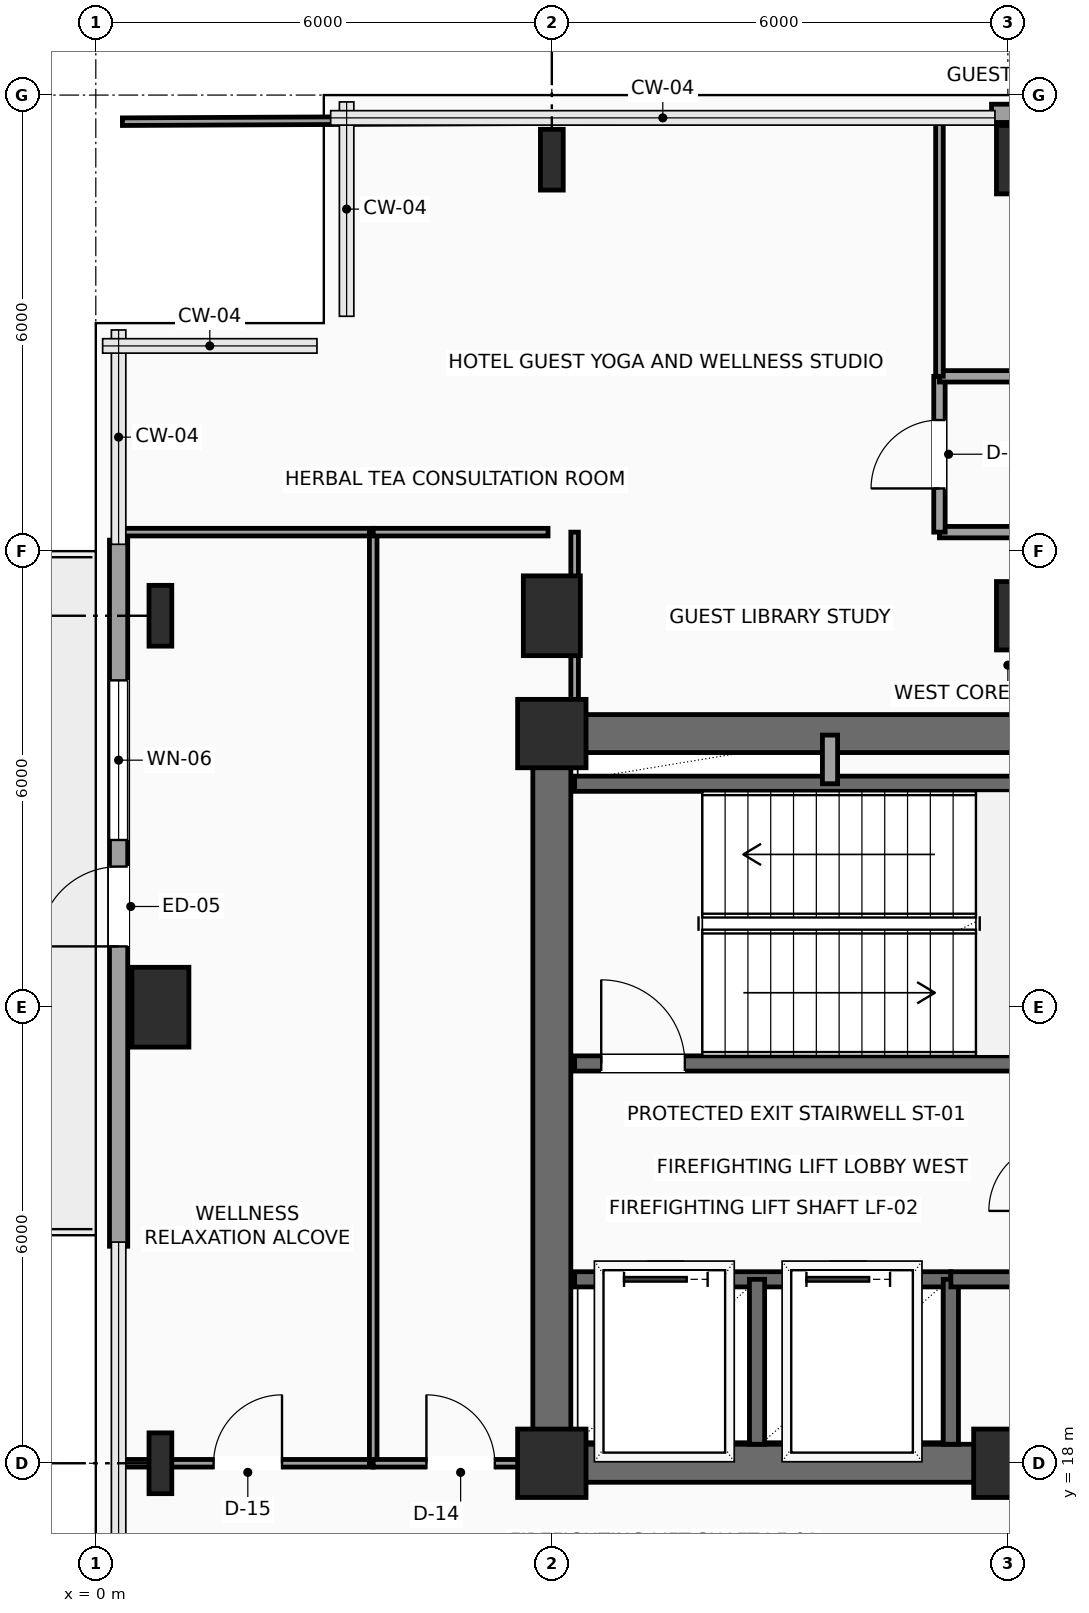
"""IFC4 building model, lengths in metres.
Left out: names, types, materials, properties, quantities, classifications, styles, units other than length and angle.
Written with IfcOpenShell. Run it as: python <this file> out.ifc"""

import sys

from ifc_helpers import new_model, si_unit, direction, frame, frame_2d, origin, origin_2d, place, context, subcontext, project, spatial, rectangle, i_section, extrude, element, fill, save


model = new_model("IFC4")
c1 = context("Model", 3, precision=1e-05, world=origin(), true_north=direction((0.0, 1.0)))
c2 = subcontext(c1, "Body", "Model", "MODEL_VIEW")
j1 = project(units=[si_unit("LENGTHUNIT", "METRE"), si_unit("PLANEANGLEUNIT", "RADIAN")], contexts=[c1])
p1 = place(None, origin())
s1 = spatial("IfcSite", under=j1, at=p1, CompositionType="ELEMENT")
p2 = place(p1, origin())
s2 = spatial("IfcBuilding", under=s1, at=p2, CompositionType="ELEMENT")
p3 = place(p2, frame((0.0, 0.0, 195.45)))
s3 = spatial("IfcBuildingStorey", under=s2, at=p3, CompositionType="ELEMENT", Elevation=195.45)
for number, where, z_axis, x_axis in (
    (1, (6.0, 18.0, 0.0), (0.0, 0.0, 1.0), (1.0, 0.0, 0.0)),
    (2, (12.0, 18.0, 0.0), (0.0, 0.0, 1.0), (1.0, 0.0, 0.0)),
    (3, (6.0, 27.6, 0.0), (0.0, 0.0, 1.0), (1.0, 0.0, 0.0)),
):
    element("IfcColumn", number, at=place(p3, frame(where, z_axis=z_axis, x_axis=x_axis)), inside=s3, PredefinedType="COLUMN", context=c2, shape_type="SweptSolid", body=[
        extrude(rectangle(XDim=0.9, YDim=0.9, at=origin_2d()), origin(), (0.0, 0.0, 1.0), 3.75),
    ])
p4 = place(p3, frame((0.85, 18.0, 0.0), z_axis=(0.0, 0.0, 1.0), x_axis=(1.0, 0.0, 0.0)))
e4 = element("IfcColumn", 4, at=p4, inside=s3, PredefinedType="COLUMN", context=c2, shape_type="SweptSolid", body=[
    extrude(i_section(OverallWidth=0.3, OverallDepth=0.8, WebThickness=0.018, FlangeThickness=0.033, FilletRadius=0.03, at=origin_2d()), origin(), (0.0, 0.0, 1.0), 3.75),
])
p5 = place(p3, frame((0.85, 24.0, 0.0), z_axis=(0.0, 0.0, 1.0), x_axis=(1.0, 0.0, 0.0)))
e5 = element("IfcColumn", 5, at=p5, inside=s3, PredefinedType="COLUMN", context=c2, shape_type="SweptSolid", body=[
    extrude(rectangle(XDim=0.75, YDim=1.05, at=origin_2d()), origin(), (0.0, 0.0, 1.0), 3.75),
])
p6 = place(p3, frame((0.85, 29.15, 0.0), z_axis=(0.0, 0.0, 1.0), x_axis=(1.0, 0.0, 0.0)))
e6 = element("IfcColumn", 6, at=p6, inside=s3, PredefinedType="COLUMN", context=c2, shape_type="SweptSolid", body=[
    extrude(i_section(OverallWidth=0.3, OverallDepth=0.8, WebThickness=0.018, FlangeThickness=0.033, FilletRadius=0.03, at=origin_2d()), origin(), (0.0, 0.0, 1.0), 3.75),
])
p7 = place(p3, frame((6.0, 29.15, 0.0), z_axis=(0.0, 0.0, 1.0), x_axis=(1.0, 0.0, 0.0)))
e7 = element("IfcColumn", 7, at=p7, inside=s3, PredefinedType="COLUMN", context=c2, shape_type="SweptSolid", body=[
    extrude(rectangle(XDim=0.75, YDim=1.05, at=origin_2d()), origin(), (0.0, 0.0, 1.0), 3.75),
])
p8 = place(p3, frame((6.0, 35.15, 0.0), z_axis=(0.0, 0.0, 1.0), x_axis=(1.0, 0.0, 0.0)))
e8 = element("IfcColumn", 8, at=p8, inside=s3, PredefinedType="COLUMN", context=c2, shape_type="SweptSolid", body=[
    extrude(i_section(OverallWidth=0.3, OverallDepth=0.8, WebThickness=0.018, FlangeThickness=0.033, FilletRadius=0.03, at=origin_2d()), origin(), (0.0, 0.0, 1.0), 3.75),
])
for number, where, z_axis, x_axis in (
    (9, (12.0, 29.15, 0.0), (0.0, 0.0, 1.0), (1.0, 0.0, 0.0)),
    (10, (12.0, 35.15, 0.0), (0.0, 0.0, 1.0), (1.0, 0.0, 0.0)),
):
    element("IfcColumn", number, at=place(p3, frame(where, z_axis=z_axis, x_axis=x_axis)), inside=s3, PredefinedType="COLUMN", context=c2, shape_type="SweptSolid", body=[
        extrude(i_section(OverallWidth=0.3, OverallDepth=0.9, WebThickness=0.019, FlangeThickness=0.035, FilletRadius=0.03, at=origin_2d()), origin(), (0.0, 0.0, 1.0), 3.75),
    ])
p9 = place(p3, frame((0.3, 20.855, 0.0), z_axis=(0.0, 0.0, 1.0), x_axis=(0.0, 1.0, 0.0)))
e11 = element("IfcWall", 11, at=p9, inside=s3, PredefinedType="SOLIDWALL", context=c2, shape_type="SweptSolid", body=[
    extrude(rectangle(XDim=9.29, YDim=0.24, at=frame_2d((4.645, 0.0))), origin(), (0.0, 0.0, 1.0), 3.475),
])
p10 = place(p9, frame((3.945, 0.0, 0.0)))
e12 = element("IfcOpeningElement", 12, at=p10, cuts=e11, PredefinedType="OPENING", context=c2, shape_type="SweptSolid", body=[
    extrude(rectangle(XDim=1.05, YDim=2.2, at=frame_2d((0.525, 1.1))), frame((0.0, 0.13, 0.0), z_axis=(0.0, -1.0, 0.0), x_axis=(1.0, 0.0, 0.0)), (0.0, 0.0, 1.0), 0.26),
])
p11 = place(p9, frame((5.345, 0.0, 0.85)))
e13 = element("IfcOpeningElement", 13, at=p11, cuts=e11, PredefinedType="OPENING", context=c2, shape_type="SweptSolid", body=[
    extrude(rectangle(XDim=2.1, YDim=2.2, at=frame_2d((1.05, 1.1))), frame((0.0, 0.13, 0.0), z_axis=(0.0, -1.0, 0.0), x_axis=(1.0, 0.0, 0.0)), (0.0, 0.0, 1.0), 0.26),
])
p12 = place(p3, frame((11.785, 35.76, 0.0), z_axis=(0.0, 0.0, 1.0), x_axis=(1.0, 0.0, 0.0)))
e14 = element("IfcWall", 14, at=p12, inside=s3, PredefinedType="SOLIDWALL", context=c2, shape_type="SweptSolid", body=[
    extrude(rectangle(XDim=0.43, YDim=0.24, at=frame_2d((0.215, 0.0))), origin(), (0.0, 0.0, 1.0), 3.475),
])
p13 = place(p3, frame((6.0, 18.0, 0.0), z_axis=(0.0, 0.0, 1.0), x_axis=(1.0, 0.0, 0.0)))
e15 = element("IfcWall", 15, at=p13, inside=s3, PredefinedType="SHEAR", context=c2, shape_type="SweptSolid", body=[
    extrude(rectangle(XDim=12.0, YDim=0.5, at=frame_2d((6.0, 0.0))), origin(), (0.0, 0.0, 1.0), 3.475),
])
p14 = place(p13, frame((7.15, 0.0, 0.0)))
e16 = element("IfcOpeningElement", 16, at=p14, cuts=e15, PredefinedType="OPENING", context=c2, shape_type="SweptSolid", body=[
    extrude(rectangle(XDim=1.6, YDim=2.3, at=frame_2d((0.8, 1.15))), frame((0.0, 0.26, 0.0), z_axis=(0.0, -1.0, 0.0), x_axis=(1.0, 0.0, 0.0)), (0.0, 0.0, 1.0), 0.52),
])
p15 = place(p3, frame((6.0, 27.6, 0.0), z_axis=(0.0, 0.0, 1.0), x_axis=(1.0, 0.0, 0.0)))
e17 = element("IfcWall", 17, at=p15, inside=s3, PredefinedType="SHEAR", context=c2, shape_type="SweptSolid", body=[
    extrude(rectangle(XDim=12.0, YDim=0.5, at=frame_2d((6.0, 0.0))), origin(), (0.0, 0.0, 1.0), 3.475),
])
p16 = place(p15, frame((10.2, 0.0, 0.0)))
e18 = element("IfcOpeningElement", 18, at=p16, cuts=e17, PredefinedType="OPENING", context=c2, shape_type="SweptSolid", body=[
    extrude(rectangle(XDim=0.9, YDim=2.15, at=frame_2d((0.45, 1.075))), frame((0.0, 0.26, 0.0), z_axis=(0.0, -1.0, 0.0), x_axis=(1.0, 0.0, 0.0)), (0.0, 0.0, 1.0), 0.52),
])
p17 = place(p3, frame((6.0, 18.0, 0.0), z_axis=(0.0, 0.0, 1.0), x_axis=(0.0, 1.0, 0.0)))
e19 = element("IfcWall", 19, at=p17, inside=s3, PredefinedType="SHEAR", context=c2, shape_type="SweptSolid", body=[
    extrude(rectangle(XDim=9.6, YDim=0.5, at=frame_2d((4.8, 0.0))), origin(), (0.0, 0.0, 1.0), 3.475),
])
p18 = place(p3, frame((6.3, 23.26, 0.0), z_axis=(0.0, 0.0, 1.0), x_axis=(1.0, 0.0, 0.0)))
e20 = element("IfcWall", 20, at=p18, inside=s3, PredefinedType="SHEAR", context=c2, shape_type="SweptSolid", body=[
    extrude(rectangle(XDim=8.88, YDim=0.2, at=frame_2d((4.44, 0.0))), origin(), (0.0, 0.0, 1.0), 3.475),
])
p19 = place(p18, frame((0.35, 0.0, 0.0)))
e21 = element("IfcOpeningElement", 21, at=p19, cuts=e20, PredefinedType="OPENING", context=c2, shape_type="SweptSolid", body=[
    extrude(rectangle(XDim=1.1, YDim=2.2, at=frame_2d((0.55, 1.1))), frame((0.0, 0.11, 0.0), z_axis=(0.0, -1.0, 0.0), x_axis=(1.0, 0.0, 0.0)), (0.0, 0.0, 1.0), 0.22),
])
p20 = place(p3, frame((6.3, 26.94, 0.0), z_axis=(0.0, 0.0, 1.0), x_axis=(1.0, 0.0, 0.0)))
e22 = element("IfcWall", 22, at=p20, inside=s3, PredefinedType="SHEAR", context=c2, shape_type="SweptSolid", body=[
    extrude(rectangle(XDim=8.88, YDim=0.2, at=frame_2d((4.44, 0.0))), origin(), (0.0, 0.0, 1.0), 3.475),
])
p21 = place(p3, frame((6.3, 20.42, 0.0), z_axis=(0.0, 0.0, 1.0), x_axis=(1.0, 0.0, 0.0)))
e23 = element("IfcWall", 23, at=p21, inside=s3, PredefinedType="SHEAR", context=c2, shape_type="SweptSolid", body=[
    extrude(rectangle(XDim=4.95, YDim=0.2, at=frame_2d((2.475, 0.0))), origin(), (0.0, 0.0, 1.0), 3.475),
])
p22 = place(p21, frame((0.65, 0.0, 0.0)))
e24 = element("IfcOpeningElement", 24, at=p22, cuts=e23, PredefinedType="OPENING", context=c2, shape_type="SweptSolid", body=[
    extrude(rectangle(XDim=1.1, YDim=2.2, at=frame_2d((0.55, 1.1))), frame((0.0, 0.11, 0.0), z_axis=(0.0, -1.0, 0.0), x_axis=(1.0, 0.0, 0.0)), (0.0, 0.0, 1.0), 0.22),
])
p23 = place(p21, frame((3.05, 0.0, 0.0)))
e25 = element("IfcOpeningElement", 25, at=p23, cuts=e23, PredefinedType="OPENING", context=c2, shape_type="SweptSolid", body=[
    extrude(rectangle(XDim=1.1, YDim=2.2, at=frame_2d((0.55, 1.1))), frame((0.0, 0.11, 0.0), z_axis=(0.0, -1.0, 0.0), x_axis=(1.0, 0.0, 0.0)), (0.0, 0.0, 1.0), 0.22),
])
for number, where, z_axis, x_axis in (
    (26, (8.7, 18.25, 0.0), (0.0, 0.0, 1.0), (0.0, 1.0, 0.0)),
    (27, (11.25, 18.25, 0.0), (0.0, 0.0, 1.0), (0.0, 1.0, 0.0)),
):
    element("IfcWall", number, at=place(p3, frame(where, z_axis=z_axis, x_axis=x_axis)), inside=s3, PredefinedType="SHEAR", context=c2, shape_type="SweptSolid", body=[
        extrude(rectangle(XDim=2.17, YDim=0.2, at=frame_2d((1.085, 0.0))), origin(), (0.0, 0.0, 1.0), 3.475),
    ])
p24 = place(p3, frame((11.25, 20.42, 0.0), z_axis=(0.0, 0.0, 1.0), x_axis=(1.0, 0.0, 0.0)))
e28 = element("IfcWall", 28, at=p24, inside=s3, PredefinedType="SHEAR", context=c2, shape_type="SweptSolid", body=[
    extrude(rectangle(XDim=1.4, YDim=0.2, at=frame_2d((0.7, 0.0))), origin(), (0.0, 0.0, 1.0), 3.475),
])
p25 = place(p3, frame((9.66, 26.94, 0.0), z_axis=(0.0, 0.0, 1.0), x_axis=(0.0, 1.0, 0.0)))
e29 = element("IfcWall", 29, at=p25, inside=s3, PredefinedType="SOLIDWALL", context=c2, shape_type="SweptSolid", body=[
    extrude(rectangle(XDim=0.64, YDim=0.2, at=frame_2d((0.32, 0.0))), origin(), (0.0, 0.0, 1.0), 3.475),
])
p26 = place(p3, frame((15.88, 30.25, 0.0), z_axis=(0.0, 0.0, 1.0), x_axis=(-1.0, 0.0, 0.0)))
e30 = element("IfcWall", 30, at=p26, inside=s3, PredefinedType="PARTITIONING", context=c2, shape_type="SweptSolid", body=[
    extrude(rectangle(XDim=4.78, YDim=0.15, at=frame_2d((2.39, 0.0))), origin(), (0.0, 0.0, 1.0), 3.475),
])
p27 = place(p26, frame((1.98, 0.0, 0.0)))
e31 = element("IfcOpeningElement", 31, at=p27, cuts=e30, PredefinedType="OPENING", context=c2, shape_type="SweptSolid", body=[
    extrude(rectangle(XDim=0.9, YDim=2.1, at=frame_2d((0.45, 1.05))), frame((0.0, 0.085, 0.0), z_axis=(0.0, -1.0, 0.0), x_axis=(1.0, 0.0, 0.0)), (0.0, 0.0, 1.0), 0.17),
])
p28 = place(p3, frame((11.1, 30.25, 0.0), z_axis=(0.0, 0.0, 1.0), x_axis=(0.0, 1.0, 0.0)))
e32 = element("IfcWall", 32, at=p28, inside=s3, PredefinedType="PARTITIONING", context=c2, shape_type="SweptSolid", body=[
    extrude(rectangle(XDim=2.05, YDim=0.15, at=frame_2d((1.025, 0.0))), origin(), (0.0, 0.0, 1.0), 3.475),
])
p29 = place(p28, frame((0.575, 0.0, 0.0)))
e33 = element("IfcOpeningElement", 33, at=p29, cuts=e32, PredefinedType="OPENING", context=c2, shape_type="SweptSolid", body=[
    extrude(rectangle(XDim=0.9, YDim=2.1, at=frame_2d((0.45, 1.05))), frame((0.0, 0.085, 0.0), z_axis=(0.0, -1.0, 0.0), x_axis=(1.0, 0.0, 0.0)), (0.0, 0.0, 1.0), 0.17),
])
p30 = place(p3, frame((11.1, 32.3, 0.0), z_axis=(0.0, 0.0, 1.0), x_axis=(1.0, 0.0, 0.0)))
e34 = element("IfcWall", 34, at=p30, inside=s3, PredefinedType="PARTITIONING", context=c2, shape_type="SweptSolid", body=[
    extrude(rectangle(XDim=3.9, YDim=0.15, at=frame_2d((1.95, 0.0))), origin(), (0.0, 0.0, 1.0), 3.067),
])
p31 = place(p30, frame((1.5, 0.0, 0.0)))
e35 = element("IfcOpeningElement", 35, at=p31, cuts=e34, PredefinedType="OPENING", context=c2, shape_type="SweptSolid", body=[
    extrude(rectangle(XDim=0.9, YDim=2.1, at=frame_2d((0.45, 1.05))), frame((0.0, 0.085, 0.0), z_axis=(0.0, -1.0, 0.0), x_axis=(1.0, 0.0, 0.0)), (0.0, 0.0, 1.0), 0.17),
])
p32 = place(p3, frame((0.3, 18.0, 0.0), z_axis=(0.0, 0.0, 1.0), x_axis=(1.0, 0.0, 0.0)))
e36 = element("IfcWall", 36, at=p32, inside=s3, PredefinedType="PARTITIONING", context=c2, shape_type="SweptSolid", body=[
    extrude(rectangle(XDim=3.35, YDim=0.1, at=frame_2d((1.675, 0.0))), origin(), (0.0, 0.0, 1.0), 3.067),
])
p33 = place(p32, frame((1.25, 0.0, 0.0)))
e37 = element("IfcOpeningElement", 37, at=p33, cuts=e36, PredefinedType="OPENING", context=c2, shape_type="SweptSolid", body=[
    extrude(rectangle(XDim=0.9, YDim=2.1, at=frame_2d((0.45, 1.05))), frame((0.0, 0.06, 0.0), z_axis=(0.0, -1.0, 0.0), x_axis=(1.0, 0.0, 0.0)), (0.0, 0.0, 1.0), 0.12),
])
p34 = place(p3, frame((0.3, 30.25, 0.0), z_axis=(0.0, 0.0, 1.0), x_axis=(1.0, 0.0, 0.0)))
e38 = element("IfcWall", 38, at=p34, inside=s3, PredefinedType="PARTITIONING", context=c2, shape_type="SweptSolid", body=[
    extrude(rectangle(XDim=3.35, YDim=0.1, at=frame_2d((1.675, 0.0))), origin(), (0.0, 0.0, 1.0), 3.475),
])
p35 = place(p3, frame((3.65, 18.0, 0.0), z_axis=(0.0, 0.0, 1.0), x_axis=(0.0, 1.0, 0.0)))
e39 = element("IfcWall", 39, at=p35, inside=s3, PredefinedType="PARTITIONING", context=c2, shape_type="SweptSolid", body=[
    extrude(rectangle(XDim=12.25, YDim=0.1, at=frame_2d((6.125, 0.0))), origin(), (0.0, 0.0, 1.0), 3.475),
])
p36 = place(p3, frame((3.65, 18.0, 0.0), z_axis=(0.0, 0.0, 1.0), x_axis=(1.0, 0.0, 0.0)))
e40 = element("IfcWall", 40, at=p36, inside=s3, PredefinedType="PARTITIONING", context=c2, shape_type="SweptSolid", body=[
    extrude(rectangle(XDim=2.3, YDim=0.1, at=frame_2d((1.15, 0.0))), origin(), (0.0, 0.0, 1.0), 3.067),
])
p37 = place(p36, frame((0.7, 0.0, 0.0)))
e41 = element("IfcOpeningElement", 41, at=p37, cuts=e40, PredefinedType="OPENING", context=c2, shape_type="SweptSolid", body=[
    extrude(rectangle(XDim=0.9, YDim=2.1, at=frame_2d((0.45, 1.05))), frame((0.0, 0.06, 0.0), z_axis=(0.0, -1.0, 0.0), x_axis=(1.0, 0.0, 0.0)), (0.0, 0.0, 1.0), 0.12),
])
p38 = place(p3, frame((3.65, 30.25, 0.0), z_axis=(0.0, 0.0, 1.0), x_axis=(1.0, 0.0, 0.0)))
e42 = element("IfcWall", 42, at=p38, inside=s3, PredefinedType="PARTITIONING", context=c2, shape_type="SweptSolid", body=[
    extrude(rectangle(XDim=2.3, YDim=0.1, at=frame_2d((1.15, 0.0))), origin(), (0.0, 0.0, 1.0), 3.475),
])
p39 = place(p3, frame((6.3, 27.65, 0.0), z_axis=(0.0, 0.0, 1.0), x_axis=(0.0, 1.0, 0.0)))
e43 = element("IfcWall", 43, at=p39, inside=s3, PredefinedType="PARTITIONING", context=c2, shape_type="SweptSolid", body=[
    extrude(rectangle(XDim=2.6, YDim=0.1, at=frame_2d((1.3, 0.0))), origin(), (0.0, 0.0, 1.0), 3.475),
])
p40 = place(p3, frame((0.35, 35.65, 0.0), z_axis=(0.0, 0.0, 1.0), x_axis=(0.999989162382, 0.004655654485, 0.0)))
e44 = element("IfcWall", 44, at=p40, inside=s3, PredefinedType="PARTITIONING", context=c2, shape_type="SweptSolid", body=[
    extrude(rectangle(XDim=10.75, YDim=0.1, at=frame_2d((5.375, 0.0))), origin(), (0.0, 0.0, 1.0), 3.475),
])
p41 = place(p3, frame((11.1, 32.3, 0.0), z_axis=(0.0, 0.0, 1.0), x_axis=(0.0, 1.0, 0.0)))
e45 = element("IfcWall", 45, at=p41, inside=s3, PredefinedType="PARTITIONING", context=c2, shape_type="SweptSolid", body=[
    extrude(rectangle(XDim=3.4, YDim=0.1, at=frame_2d((1.7, 0.0))), origin(), (0.0, 0.0, 1.0), 3.475),
])
p42 = place(p10, origin())
e46 = element("IfcDoor", 46, at=p42, inside=s3, OperationType="SINGLE_SWING_LEFT", PredefinedType="DOOR", context=c2, shape_type="SweptSolid", body=[
    extrude(rectangle(XDim=1.05, YDim=2.2, at=frame_2d((0.525, 1.1))), frame((0.0, 0.025, 0.0), z_axis=(0.0, -1.0, 0.0), x_axis=(1.0, 0.0, 0.0)), (0.0, 0.0, 1.0), 0.05),
])
fill(e12, e46)
p43 = place(p11, origin())
e47 = element("IfcWindow", 47, at=p43, inside=s3, PartitioningType="SINGLE_PANEL", PredefinedType="WINDOW", context=c2, shape_type="SweptSolid", body=[
    extrude(rectangle(XDim=2.1, YDim=2.2, at=frame_2d((1.05, 1.1))), frame((0.0, 0.03, 0.0), z_axis=(0.0, -1.0, 0.0), x_axis=(1.0, 0.0, 0.0)), (0.0, 0.0, 1.0), 0.06),
])
fill(e13, e47)
p44 = place(p19, origin())
e48 = element("IfcDoor", 48, at=p44, inside=s3, OperationType="SINGLE_SWING_LEFT", PredefinedType="DOOR", context=c2, shape_type="SweptSolid", body=[
    extrude(rectangle(XDim=1.1, YDim=2.2, at=frame_2d((0.55, 1.1))), frame((0.0, 0.025, 0.0), z_axis=(0.0, -1.0, 0.0), x_axis=(1.0, 0.0, 0.0)), (0.0, 0.0, 1.0), 0.05),
])
fill(e21, e48)
p45 = place(p22, origin())
e49 = element("IfcDoor", 49, at=p45, inside=s3, OperationType="SLIDING_TO_LEFT", PredefinedType="DOOR", context=c2, shape_type="SweptSolid", body=[
    extrude(rectangle(XDim=1.1, YDim=2.2, at=frame_2d((0.55, 1.1))), frame((0.0, 0.025, 0.0), z_axis=(0.0, -1.0, 0.0), x_axis=(1.0, 0.0, 0.0)), (0.0, 0.0, 1.0), 0.05),
])
fill(e24, e49)
p46 = place(p23, origin())
e50 = element("IfcDoor", 50, at=p46, inside=s3, OperationType="SLIDING_TO_LEFT", PredefinedType="DOOR", context=c2, shape_type="SweptSolid", body=[
    extrude(rectangle(XDim=1.1, YDim=2.2, at=frame_2d((0.55, 1.1))), frame((0.0, 0.025, 0.0), z_axis=(0.0, -1.0, 0.0), x_axis=(1.0, 0.0, 0.0)), (0.0, 0.0, 1.0), 0.05),
])
fill(e25, e50)
p47 = place(p29, origin())
e51 = element("IfcDoor", 51, at=p47, inside=s3, OperationType="SINGLE_SWING_LEFT", PredefinedType="DOOR", context=c2, shape_type="SweptSolid", body=[
    extrude(rectangle(XDim=0.9, YDim=2.1, at=frame_2d((0.45, 1.05))), frame((0.0, 0.025, 0.0), z_axis=(0.0, -1.0, 0.0), x_axis=(1.0, 0.0, 0.0)), (0.0, 0.0, 1.0), 0.05),
])
fill(e33, e51)
p48 = place(p33, origin())
e52 = element("IfcDoor", 52, at=p48, inside=s3, OperationType="SINGLE_SWING_RIGHT", PredefinedType="DOOR", context=c2, shape_type="SweptSolid", body=[
    extrude(rectangle(XDim=0.9, YDim=2.1, at=frame_2d((0.45, 1.05))), frame((0.0, 0.025, 0.0), z_axis=(0.0, -1.0, 0.0), x_axis=(1.0, 0.0, 0.0)), (0.0, 0.0, 1.0), 0.05),
])
fill(e37, e52)
p49 = place(p37, origin())
e53 = element("IfcDoor", 53, at=p49, inside=s3, OperationType="SINGLE_SWING_LEFT", PredefinedType="DOOR", context=c2, shape_type="SweptSolid", body=[
    extrude(rectangle(XDim=0.9, YDim=2.1, at=frame_2d((0.45, 1.05))), frame((0.0, 0.025, 0.0), z_axis=(0.0, -1.0, 0.0), x_axis=(1.0, 0.0, 0.0)), (0.0, 0.0, 1.0), 0.05),
])
fill(e41, e53)
save(model, sys.argv[1])
